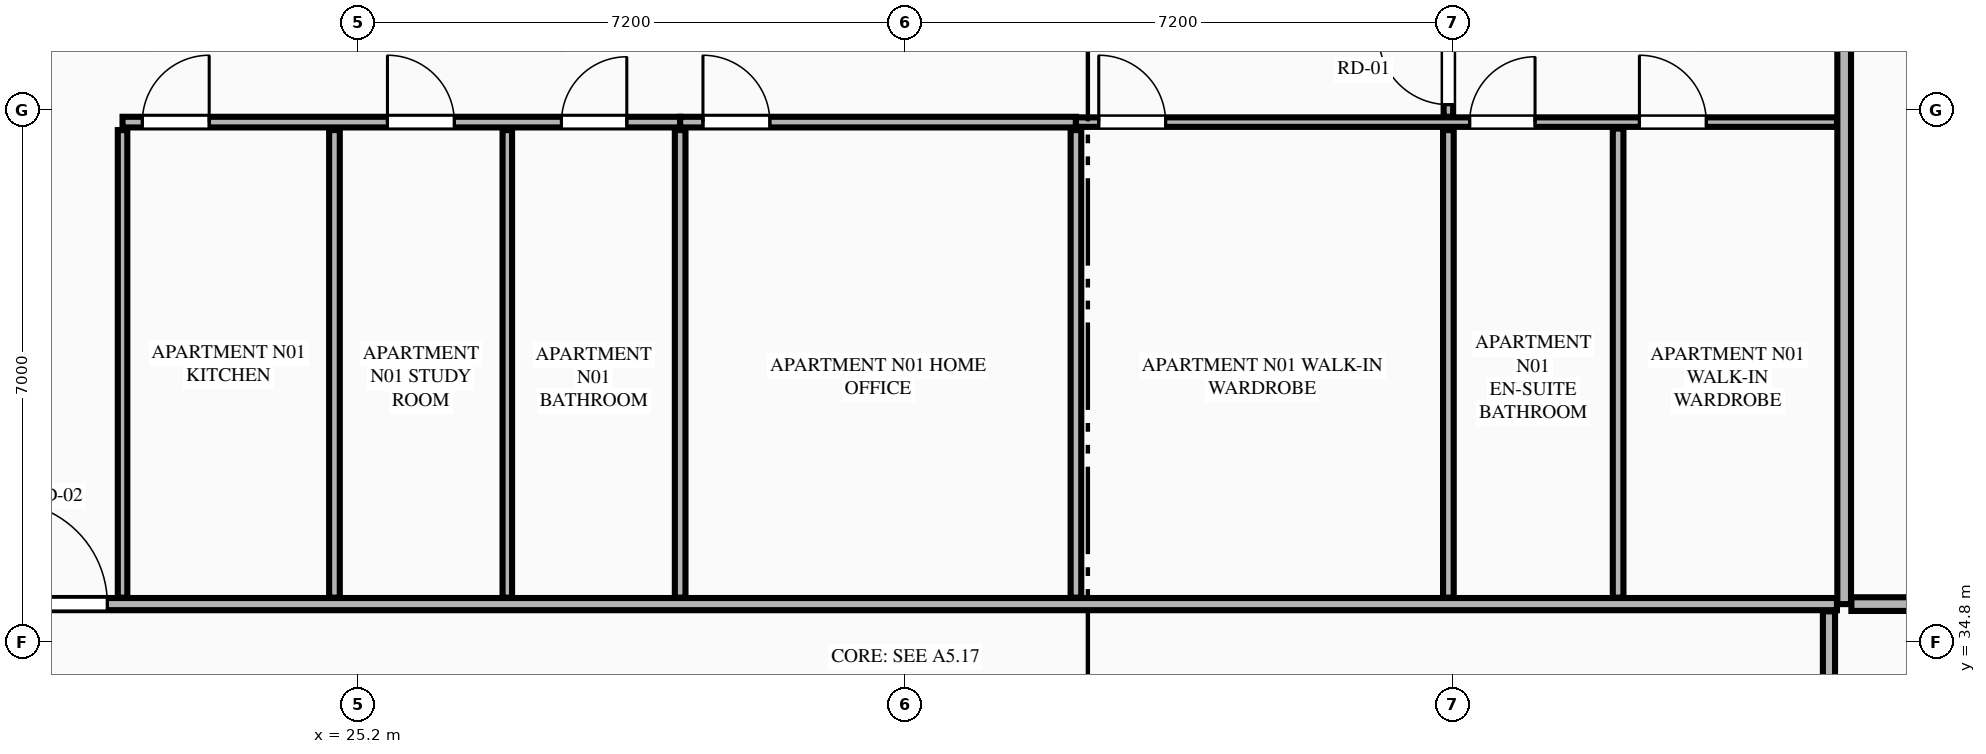
"""IFC4 building model, lengths in metres.
Left out: names, types, materials, properties, quantities, classifications, styles, units other than length and angle.
Written with IfcOpenShell. Run it as: python <this file> out.ifc"""

import sys

from ifc_helpers import new_model, si_unit, direction, frame, frame_2d, origin, place, context, subcontext, project, spatial, rectangle, extrude, element, fill, save


model = new_model("IFC4")
c1 = context("Model", 3, precision=1e-05, world=origin(), true_north=direction((0.0, 1.0)))
c2 = subcontext(c1, "Body", "Model", "MODEL_VIEW")
j1 = project(units=[si_unit("LENGTHUNIT", "METRE"), si_unit("PLANEANGLEUNIT", "RADIAN")], contexts=[c1])
p1 = place(None, origin())
s1 = spatial("IfcSite", under=j1, at=p1, CompositionType="ELEMENT")
p2 = place(p1, origin())
s2 = spatial("IfcBuilding", under=s1, at=p2, CompositionType="ELEMENT")
p3 = place(p2, frame((0.0, 0.0, 144.55)))
s3 = spatial("IfcBuildingStorey", under=s2, at=p3, CompositionType="ELEMENT", Elevation=144.55)
p4 = place(p3, frame((44.75, 35.3, 0.0), z_axis=(0.0, 0.0, 1.0), x_axis=(0.0, 1.0, 0.0)))
e1 = element("IfcWall", 1, at=p4, inside=s3, PredefinedType="PARTITIONING", context=c2, shape_type="SweptSolid", body=[
    extrude(rectangle(XDim=12.195, YDim=0.18, at=frame_2d((6.098, 0.0))), origin(), (0.0, 0.0, 1.0), 3.27),
])
p5 = place(p3, frame((20.145, 35.3, 0.0), z_axis=(0.0, 0.0, 1.0), x_axis=(1.0, 0.0, 0.0)))
e2 = element("IfcWall", 2, at=p5, inside=s3, PredefinedType="PARTITIONING", context=c2, shape_type="SweptSolid", body=[
    extrude(rectangle(XDim=24.51, YDim=0.16, at=frame_2d((12.255, 0.0))), origin(), (0.0, 0.0, 1.0), 3.27),
])
p6 = place(p5, frame((0.405, 0.0, 0.0)))
e3 = element("IfcOpeningElement", 3, at=p6, cuts=e2, PredefinedType="OPENING", context=c2, shape_type="SweptSolid", body=[
    extrude(rectangle(XDim=1.35, YDim=2.35, at=frame_2d((0.675, 1.175))), frame((0.0, 0.09, 0.0), z_axis=(0.0, -1.0, 0.0), x_axis=(1.0, 0.0, 0.0)), (0.0, 0.0, 1.0), 0.18),
])
p7 = place(p3, frame((22.1, 35.385, 0.0), z_axis=(0.0, 0.0, 1.0), x_axis=(0.0, 1.0, 0.0)))
e4 = element("IfcWall", 4, at=p7, inside=s3, PredefinedType="PARTITIONING", context=c2, shape_type="SweptSolid", body=[
    extrude(rectangle(XDim=6.151, YDim=0.125, at=frame_2d((3.075, 0.0))), origin(), (0.0, 0.0, 1.0), 2.652),
])
p8 = place(p3, frame((22.1, 41.641, 0.0), z_axis=(0.0, 0.0, 1.0), x_axis=(1.0, 0.0, 0.0)))
e5 = element("IfcWall", 5, at=p8, inside=s3, PredefinedType="PLUMBINGWALL", context=c2, shape_type="SweptSolid", body=[
    extrude(rectangle(XDim=7.336, YDim=0.14, at=frame_2d((3.668, 0.0))), origin(), (0.0, 0.0, 1.0), 3.27),
])
p9 = place(p8, frame((5.774, 0.0, 0.0)))
e6 = element("IfcOpeningElement", 6, at=p9, cuts=e5, PredefinedType="OPENING", context=c2, shape_type="SweptSolid", body=[
    extrude(rectangle(XDim=0.86, YDim=2.1, at=frame_2d((0.43, 1.05))), frame((0.0, 0.08, 0.0), z_axis=(0.0, -1.0, 0.0), x_axis=(1.0, 0.0, 0.0)), (0.0, 0.0, 1.0), 0.16),
])
p10 = place(p8, frame((0.26, 0.0, 0.0)))
e7 = element("IfcOpeningElement", 7, at=p10, cuts=e5, PredefinedType="OPENING", context=c2, shape_type="SweptSolid", body=[
    extrude(rectangle(XDim=0.88, YDim=2.15, at=frame_2d((0.44, 1.075))), frame((0.0, 0.08, 0.0), z_axis=(0.0, -1.0, 0.0), x_axis=(1.0, 0.0, 0.0)), (0.0, 0.0, 1.0), 0.16),
])
p11 = place(p8, frame((3.485, 0.0, 0.0)))
e8 = element("IfcOpeningElement", 8, at=p11, cuts=e5, PredefinedType="OPENING", context=c2, shape_type="SweptSolid", body=[
    extrude(rectangle(XDim=0.88, YDim=2.15, at=frame_2d((0.44, 1.075))), frame((0.0, 0.08, 0.0), z_axis=(0.0, -1.0, 0.0), x_axis=(1.0, 0.0, 0.0)), (0.0, 0.0, 1.0), 0.16),
])
p12 = place(p3, frame((29.436, 41.641, 0.0), z_axis=(0.0, 0.0, 1.0), x_axis=(1.0, 0.0, 0.0)))
e9 = element("IfcWall", 9, at=p12, inside=s3, PredefinedType="PLUMBINGWALL", context=c2, shape_type="SweptSolid", body=[
    extrude(rectangle(XDim=5.207, YDim=0.14, at=frame_2d((2.604, 0.0))), origin(), (0.0, 0.0, 1.0), 3.27),
])
p13 = place(p12, frame((0.3, 0.0, 0.0)))
e10 = element("IfcOpeningElement", 10, at=p13, cuts=e9, PredefinedType="OPENING", context=c2, shape_type="SweptSolid", body=[
    extrude(rectangle(XDim=0.88, YDim=2.15, at=frame_2d((0.44, 1.075))), frame((0.0, 0.08, 0.0), z_axis=(0.0, -1.0, 0.0), x_axis=(1.0, 0.0, 0.0)), (0.0, 0.0, 1.0), 0.16),
])
p14 = place(p3, frame((34.643, 41.641, 0.0), z_axis=(0.0, 0.0, 1.0), x_axis=(1.0, 0.0, 0.0)))
e11 = element("IfcWall", 11, at=p14, inside=s3, PredefinedType="PARTITIONING", context=c2, shape_type="SweptSolid", body=[
    extrude(rectangle(XDim=10.012, YDim=0.125, at=frame_2d((5.006, 0.0))), origin(), (0.0, 0.0, 1.0), 3.27),
])
p15 = place(p14, frame((5.18, 0.0, 0.0)))
e12 = element("IfcOpeningElement", 12, at=p15, cuts=e11, PredefinedType="OPENING", context=c2, shape_type="SweptSolid", body=[
    extrude(rectangle(XDim=0.86, YDim=2.1, at=frame_2d((0.43, 1.05))), frame((0.0, 0.073, 0.0), z_axis=(0.0, -1.0, 0.0), x_axis=(1.0, 0.0, 0.0)), (0.0, 0.0, 1.0), 0.145),
])
p16 = place(p14, frame((7.413, 0.0, 0.0)))
e13 = element("IfcOpeningElement", 13, at=p16, cuts=e11, PredefinedType="OPENING", context=c2, shape_type="SweptSolid", body=[
    extrude(rectangle(XDim=0.88, YDim=2.15, at=frame_2d((0.44, 1.075))), frame((0.0, 0.073, 0.0), z_axis=(0.0, -1.0, 0.0), x_axis=(1.0, 0.0, 0.0)), (0.0, 0.0, 1.0), 0.145),
])
p17 = place(p14, frame((0.3, 0.0, 0.0)))
e14 = element("IfcOpeningElement", 14, at=p17, cuts=e11, PredefinedType="OPENING", context=c2, shape_type="SweptSolid", body=[
    extrude(rectangle(XDim=0.88, YDim=2.15, at=frame_2d((0.44, 1.075))), frame((0.0, 0.073, 0.0), z_axis=(0.0, -1.0, 0.0), x_axis=(1.0, 0.0, 0.0)), (0.0, 0.0, 1.0), 0.145),
])
p18 = place(p3, frame((24.888, 35.385, 0.0), z_axis=(0.0, 0.0, 1.0), x_axis=(0.0, 1.0, 0.0)))
e15 = element("IfcWall", 15, at=p18, inside=s3, PredefinedType="PLUMBINGWALL", context=c2, shape_type="SweptSolid", body=[
    extrude(rectangle(XDim=6.151, YDim=0.14, at=frame_2d((3.075, 0.0))), origin(), (0.0, 0.0, 1.0), 3.27),
])
p19 = place(p3, frame((27.162, 35.385, 0.0), z_axis=(0.0, 0.0, 1.0), x_axis=(0.0, 1.0, 0.0)))
e16 = element("IfcWall", 16, at=p19, inside=s3, PredefinedType="PARTITIONING", context=c2, shape_type="SweptSolid", body=[
    extrude(rectangle(XDim=6.151, YDim=0.125, at=frame_2d((3.075, 0.0))), origin(), (0.0, 0.0, 1.0), 3.27),
])
p20 = place(p3, frame((39.543, 41.711, 0.0), z_axis=(0.0, 0.0, 1.0), x_axis=(0.0, 1.0, 0.0)))
e17 = element("IfcWall", 17, at=p20, inside=s3, PredefinedType="PARTITIONING", context=c2, shape_type="SweptSolid", body=[
    extrude(rectangle(XDim=1.33, YDim=0.125, at=frame_2d((0.665, 0.0))), origin(), (0.0, 0.0, 1.0), 3.27),
])
p21 = place(p20, frame((0.16, 0.0, 0.0)))
e18 = element("IfcOpeningElement", 18, at=p21, cuts=e17, PredefinedType="OPENING", context=c2, shape_type="SweptSolid", body=[
    extrude(rectangle(XDim=0.92, YDim=2.15, at=frame_2d((0.46, 1.075))), frame((0.0, 0.073, 0.0), z_axis=(0.0, -1.0, 0.0), x_axis=(1.0, 0.0, 0.0)), (0.0, 0.0, 1.0), 0.145),
])
for number, where, z_axis, x_axis in (
    (19, (29.436, 35.385, 0.0), (0.0, 0.0, 1.0), (0.0, 1.0, 0.0)),
    (20, (34.643, 35.385, 0.0), (0.0, 0.0, 1.0), (0.0, 1.0, 0.0)),
    (21, (39.543, 35.385, 0.0), (0.0, 0.0, 1.0), (0.0, 1.0, 0.0)),
):
    element("IfcWall", number, at=place(p3, frame(where, z_axis=z_axis, x_axis=x_axis)), inside=s3, PredefinedType="PLUMBINGWALL", context=c2, shape_type="SweptSolid", body=[
        extrude(rectangle(XDim=6.151, YDim=0.14, at=frame_2d((3.075, 0.0))), origin(), (0.0, 0.0, 1.0), 3.27),
    ])
p22 = place(p3, frame((41.776, 35.385, 0.0), z_axis=(0.0, 0.0, 1.0), x_axis=(0.0, 1.0, 0.0)))
e22 = element("IfcWall", 22, at=p22, inside=s3, PredefinedType="PLUMBINGWALL", context=c2, shape_type="SweptSolid", body=[
    extrude(rectangle(XDim=6.171, YDim=0.14, at=frame_2d((3.085, 0.0))), origin(), (0.0, 0.0, 1.0), 2.652),
])
p23 = place(p3, frame((44.845, 35.3, 0.0), z_axis=(0.0, 0.0, 1.0), x_axis=(1.0, 0.0, 0.0)))
e23 = element("IfcWall", 23, at=p23, inside=s3, PredefinedType="PARTITIONING", context=c2, shape_type="SweptSolid", body=[
    extrude(rectangle(XDim=7.669, YDim=0.18, at=frame_2d((3.834, 0.0))), origin(), (0.0, 0.0, 1.0), 3.27),
])
p24 = place(p3, frame((44.55, 27.499, 0.0), z_axis=(0.0, 0.0, 1.0), x_axis=(0.0, 1.0, 0.0)))
e24 = element("IfcWall", 24, at=p24, inside=s3, PredefinedType="PARTITIONING", context=c2, shape_type="SweptSolid", body=[
    extrude(rectangle(XDim=7.706, YDim=0.16, at=frame_2d((3.853, 0.0))), origin(), (0.0, 0.0, 1.0), 3.27),
])
p25 = place(p24, frame((0.4, 0.0, 0.0)))
e25 = element("IfcOpeningElement", 25, at=p25, cuts=e24, PredefinedType="OPENING", context=c2, shape_type="SweptSolid", body=[
    extrude(rectangle(XDim=1.02, YDim=2.25, at=frame_2d((0.51, 1.125))), frame((0.0, 0.09, 0.0), z_axis=(0.0, -1.0, 0.0), x_axis=(1.0, 0.0, 0.0)), (0.0, 0.0, 1.0), 0.18),
])
p26 = place(p9, origin())
e26 = element("IfcDoor", 26, at=p26, inside=s3, OperationType="SINGLE_SWING_RIGHT", PredefinedType="DOOR", context=c2, shape_type="SweptSolid", body=[
    extrude(rectangle(XDim=0.86, YDim=2.1, at=frame_2d((0.43, 1.05))), frame((0.0, 0.025, 0.0), z_axis=(0.0, -1.0, 0.0), x_axis=(1.0, 0.0, 0.0)), (0.0, 0.0, 1.0), 0.05),
])
fill(e6, e26)
p27 = place(p15, origin())
e27 = element("IfcDoor", 27, at=p27, inside=s3, OperationType="SINGLE_SWING_RIGHT", PredefinedType="DOOR", context=c2, shape_type="SweptSolid", body=[
    extrude(rectangle(XDim=0.86, YDim=2.1, at=frame_2d((0.43, 1.05))), frame((0.0, 0.025, 0.0), z_axis=(0.0, -1.0, 0.0), x_axis=(1.0, 0.0, 0.0)), (0.0, 0.0, 1.0), 0.05),
])
fill(e12, e27)
p28 = place(p16, origin())
e28 = element("IfcDoor", 28, at=p28, inside=s3, OperationType="SINGLE_SWING_LEFT", PredefinedType="DOOR", context=c2, shape_type="SweptSolid", body=[
    extrude(rectangle(XDim=0.88, YDim=2.15, at=frame_2d((0.44, 1.075))), frame((0.0, 0.025, 0.0), z_axis=(0.0, -1.0, 0.0), x_axis=(1.0, 0.0, 0.0)), (0.0, 0.0, 1.0), 0.05),
])
fill(e13, e28)
p29 = place(p6, origin())
e29 = element("IfcDoor", 29, at=p29, inside=s3, OperationType="SINGLE_SWING_LEFT", PredefinedType="DOOR", context=c2, shape_type="SweptSolid", body=[
    extrude(rectangle(XDim=1.35, YDim=2.35, at=frame_2d((0.675, 1.175))), frame((0.0, 0.025, 0.0), z_axis=(0.0, -1.0, 0.0), x_axis=(1.0, 0.0, 0.0)), (0.0, 0.0, 1.0), 0.05),
])
fill(e3, e29)
p30 = place(p10, origin())
e30 = element("IfcDoor", 30, at=p30, inside=s3, OperationType="SINGLE_SWING_RIGHT", PredefinedType="DOOR", context=c2, shape_type="SweptSolid", body=[
    extrude(rectangle(XDim=0.88, YDim=2.15, at=frame_2d((0.44, 1.075))), frame((0.0, 0.025, 0.0), z_axis=(0.0, -1.0, 0.0), x_axis=(1.0, 0.0, 0.0)), (0.0, 0.0, 1.0), 0.05),
])
fill(e7, e30)
p31 = place(p11, origin())
e31 = element("IfcDoor", 31, at=p31, inside=s3, OperationType="SINGLE_SWING_LEFT", PredefinedType="DOOR", context=c2, shape_type="SweptSolid", body=[
    extrude(rectangle(XDim=0.88, YDim=2.15, at=frame_2d((0.44, 1.075))), frame((0.0, 0.025, 0.0), z_axis=(0.0, -1.0, 0.0), x_axis=(1.0, 0.0, 0.0)), (0.0, 0.0, 1.0), 0.05),
])
fill(e8, e31)
p32 = place(p13, origin())
e32 = element("IfcDoor", 32, at=p32, inside=s3, OperationType="SINGLE_SWING_LEFT", PredefinedType="DOOR", context=c2, shape_type="SweptSolid", body=[
    extrude(rectangle(XDim=0.88, YDim=2.15, at=frame_2d((0.44, 1.075))), frame((0.0, 0.025, 0.0), z_axis=(0.0, -1.0, 0.0), x_axis=(1.0, 0.0, 0.0)), (0.0, 0.0, 1.0), 0.05),
])
fill(e10, e32)
p33 = place(p21, origin())
e33 = element("IfcDoor", 33, at=p33, inside=s3, OperationType="SINGLE_SWING_RIGHT", PredefinedType="DOOR", context=c2, shape_type="SweptSolid", body=[
    extrude(rectangle(XDim=0.92, YDim=2.15, at=frame_2d((0.46, 1.075))), frame((0.0, 0.025, 0.0), z_axis=(0.0, -1.0, 0.0), x_axis=(1.0, 0.0, 0.0)), (0.0, 0.0, 1.0), 0.05),
])
fill(e18, e33)
p34 = place(p17, origin())
e34 = element("IfcDoor", 34, at=p34, inside=s3, OperationType="SINGLE_SWING_LEFT", PredefinedType="DOOR", context=c2, shape_type="SweptSolid", body=[
    extrude(rectangle(XDim=0.88, YDim=2.15, at=frame_2d((0.44, 1.075))), frame((0.0, 0.025, 0.0), z_axis=(0.0, -1.0, 0.0), x_axis=(1.0, 0.0, 0.0)), (0.0, 0.0, 1.0), 0.05),
])
fill(e14, e34)
save(model, sys.argv[1])
